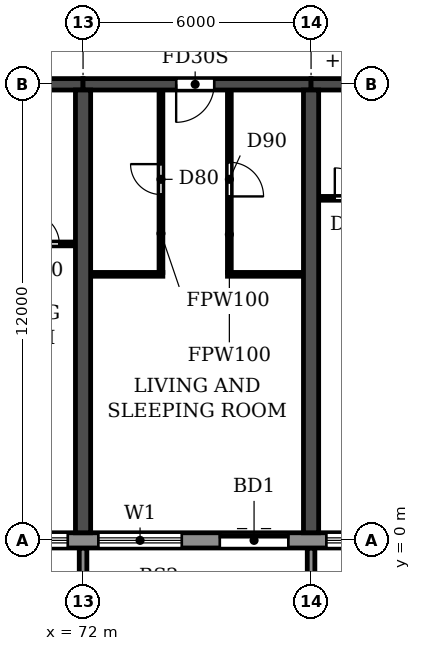
"""IFC4 building model, lengths in metres.
Left out: names, types, materials, properties, quantities, classifications, styles, units other than length and angle.
Written with IfcOpenShell. Run it as: python <this file> out.ifc"""

import sys

from ifc_helpers import new_model, si_unit, direction, frame, frame_2d, origin, place, context, subcontext, project, spatial, polyline, rectangle, outline, extrude, source, transform, mapped, element, fill, save


model = new_model("IFC4")
c1 = context("Model", 3, precision=1e-05, world=origin(), true_north=direction((0.0, 1.0)))
c2 = subcontext(c1, "Body", "Model", "MODEL_VIEW")
j1 = project(units=[si_unit("LENGTHUNIT", "METRE"), si_unit("PLANEANGLEUNIT", "RADIAN")], contexts=[c1])
p1 = place(None, origin())
s1 = spatial("IfcSite", under=j1, at=p1, CompositionType="ELEMENT")
p2 = place(p1, origin())
s2 = spatial("IfcBuilding", under=s1, at=p2, CompositionType="ELEMENT")
p3 = place(p2, frame((0.0, 0.0, 33.3)))
s3 = spatial("IfcBuildingStorey", under=s2, at=p3, CompositionType="ELEMENT", Elevation=33.3)
for number, where, z_axis, x_axis in (
    (1, (72.0, 0.2, 0.0), (0.0, 0.0, 1.0), (0.0, 1.0, 0.0)),
    (2, (78.0, 0.2, 0.0), (0.0, 0.0, 1.0), (0.0, 1.0, 0.0)),
):
    element("IfcWall", number, at=place(p3, frame(where, z_axis=z_axis, x_axis=x_axis)), inside=s3, PredefinedType="SHEAR", context=c2, shape_type="SweptSolid", body=[
        extrude(rectangle(XDim=11.65, YDim=0.4, at=frame_2d((5.825, 0.0))), origin(), (0.0, 0.0, 1.0), 3.05),
    ])
p4 = place(p3, frame((66.0, 12.0, 0.0), z_axis=(0.0, 0.0, 1.0), x_axis=(1.0, 0.0, 0.0)))
e3 = element("IfcWall", 3, at=p4, inside=s3, PredefinedType="SHEAR", context=c2, shape_type="SweptSolid", body=[
    extrude(rectangle(XDim=6.0, YDim=0.3, at=frame_2d((3.0, 0.0))), origin(), (0.0, 0.0, 1.0), 2.45),
])
p5 = place(p4, frame((2.55, 0.0, 0.0)))
e4 = element("IfcOpeningElement", 4, at=p5, cuts=e3, PredefinedType="OPENING", context=c2, shape_type="SweptSolid", body=[
    extrude(rectangle(XDim=1.0, YDim=2.1, at=frame_2d((0.5, 1.05))), frame((0.0, 0.16, 0.0), z_axis=(0.0, -1.0, 0.0), x_axis=(1.0, 0.0, 0.0)), (0.0, 0.0, 1.0), 0.32),
])
p6 = place(p3, frame((72.0, 12.0, 0.0), z_axis=(0.0, 0.0, 1.0), x_axis=(1.0, 0.0, 0.0)))
e5 = element("IfcWall", 5, at=p6, inside=s3, PredefinedType="SHEAR", context=c2, shape_type="SweptSolid", body=[
    extrude(rectangle(XDim=6.0, YDim=0.3, at=frame_2d((3.0, 0.0))), origin(), (0.0, 0.0, 1.0), 2.45),
])
p7 = place(p6, frame((2.45, 0.0, 0.0)))
e6 = element("IfcOpeningElement", 6, at=p7, cuts=e5, PredefinedType="OPENING", context=c2, shape_type="SweptSolid", body=[
    extrude(rectangle(XDim=1.0, YDim=2.1, at=frame_2d((0.5, 1.05))), frame((0.0, 0.16, 0.0), z_axis=(0.0, -1.0, 0.0), x_axis=(1.0, 0.0, 0.0)), (0.0, 0.0, 1.0), 0.32),
])
p8 = place(p3, frame((78.0, 12.0, 0.0), z_axis=(0.0, 0.0, 1.0), x_axis=(1.0, 0.0, 0.0)))
e7 = element("IfcWall", 7, at=p8, inside=s3, PredefinedType="SHEAR", context=c2, shape_type="SweptSolid", body=[
    extrude(rectangle(XDim=6.0, YDim=0.3, at=frame_2d((3.0, 0.0))), origin(), (0.0, 0.0, 1.0), 2.45),
])
p9 = place(p8, frame((2.45, 0.0, 0.0)))
e8 = element("IfcOpeningElement", 8, at=p9, cuts=e7, PredefinedType="OPENING", context=c2, shape_type="SweptSolid", body=[
    extrude(rectangle(XDim=1.0, YDim=2.1, at=frame_2d((0.5, 1.05))), frame((0.0, 0.16, 0.0), z_axis=(0.0, -1.0, 0.0), x_axis=(1.0, 0.0, 0.0)), (0.0, 0.0, 1.0), 0.32),
])
p10 = place(p3, frame((4.683, 0.0, 0.0), z_axis=(0.0, 0.0, 1.0), x_axis=(1.0, 0.0, 0.0)))
e9 = element("IfcWall", 9, at=p10, inside=s3, PredefinedType="STANDARD", context=c2, shape_type="SweptSolid", body=[
    extrude(rectangle(XDim=92.634, YDim=0.4, at=frame_2d((46.317, 0.0))), origin(), (0.0, 0.0, 1.0), 3.05),
])
p11 = place(p10, frame((1.717, 0.0, 0.9)))
e10 = element("IfcOpeningElement", 10, at=p11, cuts=e9, PredefinedType="OPENING", context=c2, shape_type="SweptSolid", body=[
    extrude(rectangle(XDim=2.2, YDim=1.5, at=frame_2d((1.1, 0.75))), frame((0.0, 0.21, 0.0), z_axis=(0.0, -1.0, 0.0), x_axis=(1.0, 0.0, 0.0)), (0.0, 0.0, 1.0), 0.42),
])
p12 = place(p10, frame((4.717, 0.0, 0.9)))
e11 = element("IfcOpeningElement", 11, at=p12, cuts=e9, PredefinedType="OPENING", context=c2, shape_type="SweptSolid", body=[
    extrude(rectangle(XDim=2.2, YDim=1.5, at=frame_2d((1.1, 0.75))), frame((0.0, 0.21, 0.0), z_axis=(0.0, -1.0, 0.0), x_axis=(1.0, 0.0, 0.0)), (0.0, 0.0, 1.0), 0.42),
])
p13 = place(p10, frame((7.917, 0.0, 0.0)))
e12 = element("IfcOpeningElement", 12, at=p13, cuts=e9, PredefinedType="OPENING", context=c2, shape_type="SweptSolid", body=[
    extrude(rectangle(XDim=1.8, YDim=2.4, at=frame_2d((0.9, 1.2))), frame((0.0, 0.21, 0.0), z_axis=(0.0, -1.0, 0.0), x_axis=(1.0, 0.0, 0.0)), (0.0, 0.0, 1.0), 0.42),
])
p14 = place(p10, frame((10.717, 0.0, 0.9)))
e13 = element("IfcOpeningElement", 13, at=p14, cuts=e9, PredefinedType="OPENING", context=c2, shape_type="SweptSolid", body=[
    extrude(rectangle(XDim=2.2, YDim=1.5, at=frame_2d((1.1, 0.75))), frame((0.0, 0.21, 0.0), z_axis=(0.0, -1.0, 0.0), x_axis=(1.0, 0.0, 0.0)), (0.0, 0.0, 1.0), 0.42),
])
p15 = place(p10, frame((13.717, 0.0, 0.9)))
e14 = element("IfcOpeningElement", 14, at=p15, cuts=e9, PredefinedType="OPENING", context=c2, shape_type="SweptSolid", body=[
    extrude(rectangle(XDim=2.2, YDim=1.5, at=frame_2d((1.1, 0.75))), frame((0.0, 0.21, 0.0), z_axis=(0.0, -1.0, 0.0), x_axis=(1.0, 0.0, 0.0)), (0.0, 0.0, 1.0), 0.42),
])
p16 = place(p10, frame((16.717, 0.0, 0.9)))
e15 = element("IfcOpeningElement", 15, at=p16, cuts=e9, PredefinedType="OPENING", context=c2, shape_type="SweptSolid", body=[
    extrude(rectangle(XDim=2.2, YDim=1.5, at=frame_2d((1.1, 0.75))), frame((0.0, 0.21, 0.0), z_axis=(0.0, -1.0, 0.0), x_axis=(1.0, 0.0, 0.0)), (0.0, 0.0, 1.0), 0.42),
])
p17 = place(p10, frame((19.717, 0.0, 0.9)))
e16 = element("IfcOpeningElement", 16, at=p17, cuts=e9, PredefinedType="OPENING", context=c2, shape_type="SweptSolid", body=[
    extrude(rectangle(XDim=2.2, YDim=1.5, at=frame_2d((1.1, 0.75))), frame((0.0, 0.21, 0.0), z_axis=(0.0, -1.0, 0.0), x_axis=(1.0, 0.0, 0.0)), (0.0, 0.0, 1.0), 0.42),
])
p18 = place(p10, frame((22.917, 0.0, 0.0)))
e17 = element("IfcOpeningElement", 17, at=p18, cuts=e9, PredefinedType="OPENING", context=c2, shape_type="SweptSolid", body=[
    extrude(rectangle(XDim=1.8, YDim=2.4, at=frame_2d((0.9, 1.2))), frame((0.0, 0.21, 0.0), z_axis=(0.0, -1.0, 0.0), x_axis=(1.0, 0.0, 0.0)), (0.0, 0.0, 1.0), 0.42),
])
p19 = place(p10, frame((25.717, 0.0, 0.9)))
e18 = element("IfcOpeningElement", 18, at=p19, cuts=e9, PredefinedType="OPENING", context=c2, shape_type="SweptSolid", body=[
    extrude(rectangle(XDim=2.2, YDim=1.5, at=frame_2d((1.1, 0.75))), frame((0.0, 0.21, 0.0), z_axis=(0.0, -1.0, 0.0), x_axis=(1.0, 0.0, 0.0)), (0.0, 0.0, 1.0), 0.42),
])
p20 = place(p10, frame((28.717, 0.0, 0.9)))
e19 = element("IfcOpeningElement", 19, at=p20, cuts=e9, PredefinedType="OPENING", context=c2, shape_type="SweptSolid", body=[
    extrude(rectangle(XDim=2.2, YDim=1.5, at=frame_2d((1.1, 0.75))), frame((0.0, 0.21, 0.0), z_axis=(0.0, -1.0, 0.0), x_axis=(1.0, 0.0, 0.0)), (0.0, 0.0, 1.0), 0.42),
])
p21 = place(p10, frame((31.717, 0.0, 0.9)))
e20 = element("IfcOpeningElement", 20, at=p21, cuts=e9, PredefinedType="OPENING", context=c2, shape_type="SweptSolid", body=[
    extrude(rectangle(XDim=2.2, YDim=1.5, at=frame_2d((1.1, 0.75))), frame((0.0, 0.21, 0.0), z_axis=(0.0, -1.0, 0.0), x_axis=(1.0, 0.0, 0.0)), (0.0, 0.0, 1.0), 0.42),
])
p22 = place(p10, frame((34.717, 0.0, 0.9)))
e21 = element("IfcOpeningElement", 21, at=p22, cuts=e9, PredefinedType="OPENING", context=c2, shape_type="SweptSolid", body=[
    extrude(rectangle(XDim=2.2, YDim=1.5, at=frame_2d((1.1, 0.75))), frame((0.0, 0.21, 0.0), z_axis=(0.0, -1.0, 0.0), x_axis=(1.0, 0.0, 0.0)), (0.0, 0.0, 1.0), 0.42),
])
p23 = place(p10, frame((37.717, 0.0, 0.9)))
e22 = element("IfcOpeningElement", 22, at=p23, cuts=e9, PredefinedType="OPENING", context=c2, shape_type="SweptSolid", body=[
    extrude(rectangle(XDim=2.2, YDim=1.5, at=frame_2d((1.1, 0.75))), frame((0.0, 0.21, 0.0), z_axis=(0.0, -1.0, 0.0), x_axis=(1.0, 0.0, 0.0)), (0.0, 0.0, 1.0), 0.42),
])
p24 = place(p10, frame((40.717, 0.0, 0.9)))
e23 = element("IfcOpeningElement", 23, at=p24, cuts=e9, PredefinedType="OPENING", context=c2, shape_type="SweptSolid", body=[
    extrude(rectangle(XDim=2.2, YDim=1.5, at=frame_2d((1.1, 0.75))), frame((0.0, 0.21, 0.0), z_axis=(0.0, -1.0, 0.0), x_axis=(1.0, 0.0, 0.0)), (0.0, 0.0, 1.0), 0.42),
])
p25 = place(p10, frame((43.717, 0.0, 0.9)))
e24 = element("IfcOpeningElement", 24, at=p25, cuts=e9, PredefinedType="OPENING", context=c2, shape_type="SweptSolid", body=[
    extrude(rectangle(XDim=2.2, YDim=1.5, at=frame_2d((1.1, 0.75))), frame((0.0, 0.21, 0.0), z_axis=(0.0, -1.0, 0.0), x_axis=(1.0, 0.0, 0.0)), (0.0, 0.0, 1.0), 0.42),
])
p26 = place(p10, frame((46.917, 0.0, 0.0)))
e25 = element("IfcOpeningElement", 25, at=p26, cuts=e9, PredefinedType="OPENING", context=c2, shape_type="SweptSolid", body=[
    extrude(rectangle(XDim=1.8, YDim=2.4, at=frame_2d((0.9, 1.2))), frame((0.0, 0.21, 0.0), z_axis=(0.0, -1.0, 0.0), x_axis=(1.0, 0.0, 0.0)), (0.0, 0.0, 1.0), 0.42),
])
p27 = place(p10, frame((49.717, 0.0, 0.9)))
e26 = element("IfcOpeningElement", 26, at=p27, cuts=e9, PredefinedType="OPENING", context=c2, shape_type="SweptSolid", body=[
    extrude(rectangle(XDim=2.2, YDim=1.5, at=frame_2d((1.1, 0.75))), frame((0.0, 0.21, 0.0), z_axis=(0.0, -1.0, 0.0), x_axis=(1.0, 0.0, 0.0)), (0.0, 0.0, 1.0), 0.42),
])
p28 = place(p10, frame((52.717, 0.0, 0.9)))
e27 = element("IfcOpeningElement", 27, at=p28, cuts=e9, PredefinedType="OPENING", context=c2, shape_type="SweptSolid", body=[
    extrude(rectangle(XDim=2.2, YDim=1.5, at=frame_2d((1.1, 0.75))), frame((0.0, 0.21, 0.0), z_axis=(0.0, -1.0, 0.0), x_axis=(1.0, 0.0, 0.0)), (0.0, 0.0, 1.0), 0.42),
])
p29 = place(p10, frame((55.717, 0.0, 0.9)))
e28 = element("IfcOpeningElement", 28, at=p29, cuts=e9, PredefinedType="OPENING", context=c2, shape_type="SweptSolid", body=[
    extrude(rectangle(XDim=2.2, YDim=1.5, at=frame_2d((1.1, 0.75))), frame((0.0, 0.21, 0.0), z_axis=(0.0, -1.0, 0.0), x_axis=(1.0, 0.0, 0.0)), (0.0, 0.0, 1.0), 0.42),
])
p30 = place(p10, frame((58.917, 0.0, 0.0)))
e29 = element("IfcOpeningElement", 29, at=p30, cuts=e9, PredefinedType="OPENING", context=c2, shape_type="SweptSolid", body=[
    extrude(rectangle(XDim=1.8, YDim=2.4, at=frame_2d((0.9, 1.2))), frame((0.0, 0.21, 0.0), z_axis=(0.0, -1.0, 0.0), x_axis=(1.0, 0.0, 0.0)), (0.0, 0.0, 1.0), 0.42),
])
p31 = place(p10, frame((61.717, 0.0, 0.9)))
e30 = element("IfcOpeningElement", 30, at=p31, cuts=e9, PredefinedType="OPENING", context=c2, shape_type="SweptSolid", body=[
    extrude(rectangle(XDim=2.2, YDim=1.5, at=frame_2d((1.1, 0.75))), frame((0.0, 0.21, 0.0), z_axis=(0.0, -1.0, 0.0), x_axis=(1.0, 0.0, 0.0)), (0.0, 0.0, 1.0), 0.42),
])
p32 = place(p10, frame((64.717, 0.0, 0.9)))
e31 = element("IfcOpeningElement", 31, at=p32, cuts=e9, PredefinedType="OPENING", context=c2, shape_type="SweptSolid", body=[
    extrude(rectangle(XDim=2.2, YDim=1.5, at=frame_2d((1.1, 0.75))), frame((0.0, 0.21, 0.0), z_axis=(0.0, -1.0, 0.0), x_axis=(1.0, 0.0, 0.0)), (0.0, 0.0, 1.0), 0.42),
])
p33 = place(p10, frame((67.717, 0.0, 0.9)))
e32 = element("IfcOpeningElement", 32, at=p33, cuts=e9, PredefinedType="OPENING", context=c2, shape_type="SweptSolid", body=[
    extrude(rectangle(XDim=2.2, YDim=1.5, at=frame_2d((1.1, 0.75))), frame((0.0, 0.21, 0.0), z_axis=(0.0, -1.0, 0.0), x_axis=(1.0, 0.0, 0.0)), (0.0, 0.0, 1.0), 0.42),
])
p34 = place(p10, frame((70.917, 0.0, 0.0)))
e33 = element("IfcOpeningElement", 33, at=p34, cuts=e9, PredefinedType="OPENING", context=c2, shape_type="SweptSolid", body=[
    extrude(rectangle(XDim=1.8, YDim=2.4, at=frame_2d((0.9, 1.2))), frame((0.0, 0.21, 0.0), z_axis=(0.0, -1.0, 0.0), x_axis=(1.0, 0.0, 0.0)), (0.0, 0.0, 1.0), 0.42),
])
p35 = place(p10, frame((73.717, 0.0, 0.9)))
e34 = element("IfcOpeningElement", 34, at=p35, cuts=e9, PredefinedType="OPENING", context=c2, shape_type="SweptSolid", body=[
    extrude(rectangle(XDim=2.2, YDim=1.5, at=frame_2d((1.1, 0.75))), frame((0.0, 0.21, 0.0), z_axis=(0.0, -1.0, 0.0), x_axis=(1.0, 0.0, 0.0)), (0.0, 0.0, 1.0), 0.42),
])
p36 = place(p10, frame((76.717, 0.0, 0.9)))
e35 = element("IfcOpeningElement", 35, at=p36, cuts=e9, PredefinedType="OPENING", context=c2, shape_type="SweptSolid", body=[
    extrude(rectangle(XDim=2.2, YDim=1.5, at=frame_2d((1.1, 0.75))), frame((0.0, 0.21, 0.0), z_axis=(0.0, -1.0, 0.0), x_axis=(1.0, 0.0, 0.0)), (0.0, 0.0, 1.0), 0.42),
])
p37 = place(p10, frame((79.717, 0.0, 0.9)))
e36 = element("IfcOpeningElement", 36, at=p37, cuts=e9, PredefinedType="OPENING", context=c2, shape_type="SweptSolid", body=[
    extrude(rectangle(XDim=2.2, YDim=1.5, at=frame_2d((1.1, 0.75))), frame((0.0, 0.21, 0.0), z_axis=(0.0, -1.0, 0.0), x_axis=(1.0, 0.0, 0.0)), (0.0, 0.0, 1.0), 0.42),
])
p38 = place(p10, frame((82.717, 0.0, 0.9)))
e37 = element("IfcOpeningElement", 37, at=p38, cuts=e9, PredefinedType="OPENING", context=c2, shape_type="SweptSolid", body=[
    extrude(rectangle(XDim=2.2, YDim=1.5, at=frame_2d((1.1, 0.75))), frame((0.0, 0.21, 0.0), z_axis=(0.0, -1.0, 0.0), x_axis=(1.0, 0.0, 0.0)), (0.0, 0.0, 1.0), 0.42),
])
p39 = place(p10, frame((85.717, 0.0, 0.9)))
e38 = element("IfcOpeningElement", 38, at=p39, cuts=e9, PredefinedType="OPENING", context=c2, shape_type="SweptSolid", body=[
    extrude(rectangle(XDim=2.2, YDim=1.5, at=frame_2d((1.1, 0.75))), frame((0.0, 0.21, 0.0), z_axis=(0.0, -1.0, 0.0), x_axis=(1.0, 0.0, 0.0)), (0.0, 0.0, 1.0), 0.42),
])
p40 = place(p10, frame((88.717, 0.0, 0.9)))
e39 = element("IfcOpeningElement", 39, at=p40, cuts=e9, PredefinedType="OPENING", context=c2, shape_type="SweptSolid", body=[
    extrude(rectangle(XDim=2.2, YDim=1.5, at=frame_2d((1.1, 0.75))), frame((0.0, 0.21, 0.0), z_axis=(0.0, -1.0, 0.0), x_axis=(1.0, 0.0, 0.0)), (0.0, 0.0, 1.0), 0.42),
])
m1 = source(origin(), c2, "Body", "SweptSolid", [
    extrude(outline(polyline([(0.0, 0.0), (0.2, 0.0), (0.2, 1.65), (0.0, 1.65), (0.0, 0.0)])), origin(), (0.0, 0.0, 1.0), 3.1),
])
for number, where in (
    (40, (71.9, -1.85, 0.0)),
    (41, (77.9, -1.85, 0.0)),
):
    element("IfcWall", number, at=place(p3, frame(where)), inside=s3, PredefinedType="STANDARD", context=c2, shape_type="MappedRepresentation", body=[
        mapped(m1, transform((0.0, 0.0, 0.0))),
    ])
p41 = place(p3, frame((72.21, 7.0, 0.0), z_axis=(0.0, 0.0, 1.0), x_axis=(1.0, 0.0, 0.0)))
e42 = element("IfcWall", 42, at=p41, inside=s3, PredefinedType="PARTITIONING", context=c2, shape_type="SweptSolid", body=[
    extrude(rectangle(XDim=1.89, YDim=0.1, at=frame_2d((0.945, 0.0))), origin(), (0.0, 0.0, 1.0), 3.05),
])
p42 = place(p3, frame((75.8, 7.0, 0.0), z_axis=(0.0, 0.0, 1.0), x_axis=(1.0, 0.0, 0.0)))
e43 = element("IfcWall", 43, at=p42, inside=s3, PredefinedType="PARTITIONING", context=c2, shape_type="SweptSolid", body=[
    extrude(rectangle(XDim=1.99, YDim=0.1, at=frame_2d((0.995, 0.0))), origin(), (0.0, 0.0, 1.0), 3.05),
])
p43 = place(p3, frame((69.9, 7.8, 0.0), z_axis=(0.0, 0.0, 1.0), x_axis=(1.0, 0.0, 0.0)))
e44 = element("IfcWall", 44, at=p43, inside=s3, PredefinedType="PARTITIONING", context=c2, shape_type="SweptSolid", body=[
    extrude(rectangle(XDim=1.89, YDim=0.1, at=frame_2d((0.945, 0.0))), origin(), (0.0, 0.0, 1.0), 3.05),
])
p44 = place(p43, frame((0.675, 0.0, 0.0)))
e45 = element("IfcOpeningElement", 45, at=p44, cuts=e44, PredefinedType="OPENING", context=c2, shape_type="SweptSolid", body=[
    extrude(rectangle(XDim=0.8, YDim=2.1, at=frame_2d((0.4, 1.05))), frame((0.0, 0.06, 0.0), z_axis=(0.0, -1.0, 0.0), x_axis=(1.0, 0.0, 0.0)), (0.0, 0.0, 1.0), 0.12),
])
p45 = place(p3, frame((78.21, 9.0, 0.0), z_axis=(0.0, 0.0, 1.0), x_axis=(1.0, 0.0, 0.0)))
e46 = element("IfcWall", 46, at=p45, inside=s3, PredefinedType="PARTITIONING", context=c2, shape_type="SweptSolid", body=[
    extrude(rectangle(XDim=1.89, YDim=0.1, at=frame_2d((0.945, 0.0))), origin(), (0.0, 0.0, 1.0), 3.05),
])
p46 = place(p45, frame((0.415, 0.0, 0.0)))
e47 = element("IfcOpeningElement", 47, at=p46, cuts=e46, PredefinedType="OPENING", context=c2, shape_type="SweptSolid", body=[
    extrude(rectangle(XDim=0.8, YDim=2.1, at=frame_2d((0.4, 1.05))), frame((0.0, 0.06, 0.0), z_axis=(0.0, -1.0, 0.0), x_axis=(1.0, 0.0, 0.0)), (0.0, 0.0, 1.0), 0.12),
])
p47 = place(p3, frame((74.05, 7.05, 0.0), z_axis=(0.0, 0.0, 1.0), x_axis=(0.0, 1.0, 0.0)))
e48 = element("IfcWall", 48, at=p47, inside=s3, PredefinedType="PARTITIONING", context=c2, shape_type="SweptSolid", body=[
    extrude(rectangle(XDim=4.79, YDim=0.1, at=frame_2d((2.395, 0.0))), origin(), (0.0, 0.0, 1.0), 3.05),
])
p48 = place(p47, frame((2.05, 0.0, 0.0)))
e49 = element("IfcOpeningElement", 49, at=p48, cuts=e48, PredefinedType="OPENING", context=c2, shape_type="SweptSolid", body=[
    extrude(rectangle(XDim=0.8, YDim=2.1, at=frame_2d((0.4, 1.05))), frame((0.0, 0.06, 0.0), z_axis=(0.0, -1.0, 0.0), x_axis=(1.0, 0.0, 0.0)), (0.0, 0.0, 1.0), 0.12),
])
p49 = place(p3, frame((75.85, 7.05, 0.0), z_axis=(0.0, 0.0, 1.0), x_axis=(0.0, 1.0, 0.0)))
e50 = element("IfcWall", 50, at=p49, inside=s3, PredefinedType="PARTITIONING", context=c2, shape_type="SweptSolid", body=[
    extrude(rectangle(XDim=4.79, YDim=0.1, at=frame_2d((2.395, 0.0))), origin(), (0.0, 0.0, 1.0), 3.05),
])
p50 = place(p49, frame((2.0, 0.0, 0.0)))
e51 = element("IfcOpeningElement", 51, at=p50, cuts=e50, PredefinedType="OPENING", context=c2, shape_type="SweptSolid", body=[
    extrude(rectangle(XDim=0.9, YDim=2.1, at=frame_2d((0.45, 1.05))), frame((0.0, 0.06, 0.0), z_axis=(0.0, -1.0, 0.0), x_axis=(1.0, 0.0, 0.0)), (0.0, 0.0, 1.0), 0.12),
])
p51 = place(p32, origin())
e52 = element("IfcWindow", 52, at=p51, inside=s3, PartitioningType="DOUBLE_PANEL_HORIZONTAL", PredefinedType="WINDOW", context=c2, shape_type="SweptSolid", body=[
    extrude(rectangle(XDim=2.2, YDim=1.5, at=frame_2d((1.1, 0.75))), frame((0.0, 0.03, 0.0), z_axis=(0.0, -1.0, 0.0), x_axis=(1.0, 0.0, 0.0)), (0.0, 0.0, 1.0), 0.06),
])
fill(e31, e52)
p52 = place(p33, origin())
e53 = element("IfcWindow", 53, at=p52, inside=s3, PartitioningType="DOUBLE_PANEL_HORIZONTAL", PredefinedType="WINDOW", context=c2, shape_type="SweptSolid", body=[
    extrude(rectangle(XDim=2.2, YDim=1.5, at=frame_2d((1.1, 0.75))), frame((0.0, 0.03, 0.0), z_axis=(0.0, -1.0, 0.0), x_axis=(1.0, 0.0, 0.0)), (0.0, 0.0, 1.0), 0.06),
])
fill(e32, e53)
p53 = place(p34, origin())
e54 = element("IfcDoor", 54, at=p53, inside=s3, OperationType="DOUBLE_DOOR_SLIDING", PredefinedType="DOOR", context=c2, shape_type="SweptSolid", body=[
    extrude(rectangle(XDim=1.8, YDim=2.4, at=frame_2d((0.9, 1.2))), frame((0.0, 0.025, 0.0), z_axis=(0.0, -1.0, 0.0), x_axis=(1.0, 0.0, 0.0)), (0.0, 0.0, 1.0), 0.05),
])
fill(e33, e54)
p54 = place(p35, origin())
e55 = element("IfcWindow", 55, at=p54, inside=s3, PartitioningType="DOUBLE_PANEL_HORIZONTAL", PredefinedType="WINDOW", context=c2, shape_type="SweptSolid", body=[
    extrude(rectangle(XDim=2.2, YDim=1.5, at=frame_2d((1.1, 0.75))), frame((0.0, 0.03, 0.0), z_axis=(0.0, -1.0, 0.0), x_axis=(1.0, 0.0, 0.0)), (0.0, 0.0, 1.0), 0.06),
])
fill(e34, e55)
p55 = place(p44, origin())
e56 = element("IfcDoor", 56, at=p55, inside=s3, OperationType="SINGLE_SWING_LEFT", PredefinedType="DOOR", context=c2, shape_type="SweptSolid", body=[
    extrude(rectangle(XDim=0.8, YDim=2.1, at=frame_2d((0.4, 1.05))), frame((0.0, 0.025, 0.0), z_axis=(0.0, -1.0, 0.0), x_axis=(1.0, 0.0, 0.0)), (0.0, 0.0, 1.0), 0.05),
])
fill(e45, e56)
p56 = place(p48, origin())
e57 = element("IfcDoor", 57, at=p56, inside=s3, OperationType="SINGLE_SWING_RIGHT", PredefinedType="DOOR", context=c2, shape_type="SweptSolid", body=[
    extrude(rectangle(XDim=0.8, YDim=2.1, at=frame_2d((0.4, 1.05))), frame((0.0, 0.025, 0.0), z_axis=(0.0, -1.0, 0.0), x_axis=(1.0, 0.0, 0.0)), (0.0, 0.0, 1.0), 0.05),
])
fill(e49, e57)
p57 = place(p7, frame((1.0, 0.0, 0.0), z_axis=(0.0, 0.0, 1.0), x_axis=(-1.0, 0.0, 0.0)))
e58 = element("IfcDoor", 58, at=p57, inside=s3, OperationType="SINGLE_SWING_RIGHT", PredefinedType="DOOR", context=c2, shape_type="SweptSolid", body=[
    extrude(rectangle(XDim=1.0, YDim=2.1, at=frame_2d((0.5, 1.05))), frame((0.0, 0.025, 0.0), z_axis=(0.0, -1.0, 0.0), x_axis=(1.0, 0.0, 0.0)), (0.0, 0.0, 1.0), 0.05),
])
fill(e6, e58)
p58 = place(p50, frame((0.9, 0.0, 0.0), z_axis=(0.0, 0.0, 1.0), x_axis=(-1.0, 0.0, 0.0)))
e59 = element("IfcDoor", 59, at=p58, inside=s3, OperationType="SINGLE_SWING_RIGHT", PredefinedType="DOOR", context=c2, shape_type="SweptSolid", body=[
    extrude(rectangle(XDim=0.9, YDim=2.1, at=frame_2d((0.45, 1.05))), frame((0.0, 0.025, 0.0), z_axis=(0.0, -1.0, 0.0), x_axis=(1.0, 0.0, 0.0)), (0.0, 0.0, 1.0), 0.05),
])
fill(e51, e59)
p59 = place(p46, origin())
e60 = element("IfcDoor", 60, at=p59, inside=s3, OperationType="SINGLE_SWING_LEFT", PredefinedType="DOOR", context=c2, shape_type="SweptSolid", body=[
    extrude(rectangle(XDim=0.8, YDim=2.1, at=frame_2d((0.4, 1.05))), frame((0.0, 0.025, 0.0), z_axis=(0.0, -1.0, 0.0), x_axis=(1.0, 0.0, 0.0)), (0.0, 0.0, 1.0), 0.05),
])
fill(e47, e60)
save(model, sys.argv[1])
